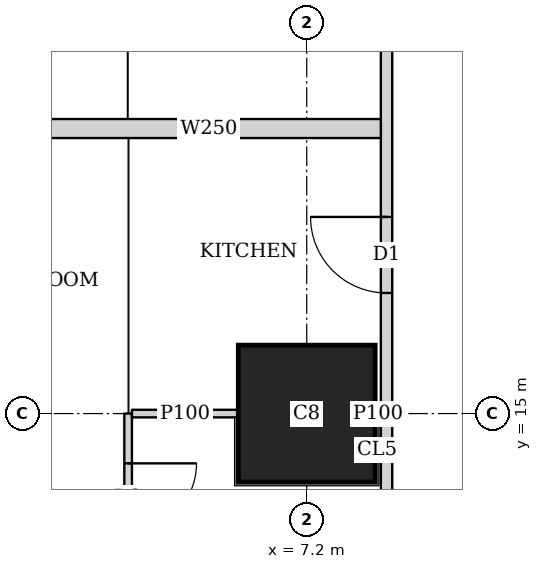
"""IFC4 building model, lengths in metres.
Left out: names, types, materials, properties, quantities, classifications, styles, units other than length and angle.
Written with IfcOpenShell. Run it as: python <this file> out.ifc"""

import sys

from ifc_helpers import new_model, si_unit, direction, frame, frame_2d, origin, origin_2d, place, context, subcontext, project, spatial, rectangle, extrude, element, fill, save


model = new_model("IFC4")
c1 = context("Model", 3, precision=1e-05, world=origin(), true_north=direction((0.0, 1.0)))
c2 = subcontext(c1, "Body", "Model", "MODEL_VIEW")
j1 = project(units=[si_unit("LENGTHUNIT", "METRE"), si_unit("PLANEANGLEUNIT", "RADIAN")], contexts=[c1])
p1 = place(None, origin())
s1 = spatial("IfcSite", under=j1, at=p1, CompositionType="ELEMENT")
p2 = place(p1, origin())
s2 = spatial("IfcBuilding", under=s1, at=p2, CompositionType="ELEMENT")
p3 = place(p2, frame((0.0, 0.0, 31.25)))
s3 = spatial("IfcBuildingStorey", under=s2, at=p3, CompositionType="ELEMENT", Elevation=31.25)
p4 = place(p3, frame((7.2, 15.0, 0.0), z_axis=(0.0, 0.0, 1.0), x_axis=(1.0, 0.0, 0.0)))
e1 = element("IfcColumn", 1, at=p4, inside=s3, PredefinedType="COLUMN", context=c2, shape_type="SweptSolid", body=[
    extrude(rectangle(XDim=1.8, YDim=1.8, at=origin_2d()), origin(), (0.0, 0.0, 1.0), 3.75),
])
p5 = place(p3, frame((8.25, 2.426, 0.0), z_axis=(0.0, 0.0, 1.0), x_axis=(0.0, 1.0, 0.0)))
e2 = element("IfcWall", 2, at=p5, inside=s3, PredefinedType="SOLIDWALL", context=c2, shape_type="SweptSolid", body=[
    extrude(rectangle(XDim=40.173, YDim=0.15, at=frame_2d((20.086, 0.0))), origin(), (0.0, 0.0, 1.0), 3.5),
])
p6 = place(p5, frame((14.161, 0.0, 0.0)))
e3 = element("IfcOpeningElement", 3, at=p6, cuts=e2, PredefinedType="OPENING", context=c2, shape_type="SweptSolid", body=[
    extrude(rectangle(XDim=1.0, YDim=2.1, at=frame_2d((0.5, 1.05))), frame((0.0, 0.085, 0.0), z_axis=(0.0, -1.0, 0.0), x_axis=(1.0, 0.0, 0.0)), (0.0, 0.0, 1.0), 0.17),
])
p7 = place(p5, frame((17.487, 0.0, 0.0)))
e4 = element("IfcOpeningElement", 4, at=p7, cuts=e2, PredefinedType="OPENING", context=c2, shape_type="SweptSolid", body=[
    extrude(rectangle(XDim=1.0, YDim=2.1, at=frame_2d((0.5, 1.05))), frame((0.0, 0.085, 0.0), z_axis=(0.0, -1.0, 0.0), x_axis=(1.0, 0.0, 0.0)), (0.0, 0.0, 1.0), 0.17),
])
p8 = place(p5, frame((29.161, 0.0, 0.0)))
e5 = element("IfcOpeningElement", 5, at=p8, cuts=e2, PredefinedType="OPENING", context=c2, shape_type="SweptSolid", body=[
    extrude(rectangle(XDim=1.0, YDim=2.1, at=frame_2d((0.5, 1.05))), frame((0.0, 0.085, 0.0), z_axis=(0.0, -1.0, 0.0), x_axis=(1.0, 0.0, 0.0)), (0.0, 0.0, 1.0), 0.17),
])
p9 = place(p3, frame((4.85, 3.018, 0.0), z_axis=(0.0, 0.0, 1.0), x_axis=(0.0, 1.0, 0.0)))
e6 = element("IfcWall", 6, at=p9, inside=s3, PredefinedType="PARTITIONING", context=c2, shape_type="SweptSolid", body=[
    extrude(rectangle(XDim=11.982, YDim=0.1, at=frame_2d((5.991, 0.0))), origin(), (0.0, 0.0, 1.0), 3.5),
])
p10 = place(p9, frame((10.427, 0.0, 0.0)))
e7 = element("IfcOpeningElement", 7, at=p10, cuts=e6, PredefinedType="OPENING", context=c2, shape_type="SweptSolid", body=[
    extrude(rectangle(XDim=0.9, YDim=2.1, at=frame_2d((0.45, 1.05))), frame((0.0, 0.06, 0.0), z_axis=(0.0, -1.0, 0.0), x_axis=(1.0, 0.0, 0.0)), (0.0, 0.0, 1.0), 0.12),
])
p11 = place(p9, frame((6.982, 0.0, 0.0)))
e8 = element("IfcOpeningElement", 8, at=p11, cuts=e6, PredefinedType="OPENING", context=c2, shape_type="SweptSolid", body=[
    extrude(rectangle(XDim=0.9, YDim=2.1, at=frame_2d((0.45, 1.05))), frame((0.0, 0.06, 0.0), z_axis=(0.0, -1.0, 0.0), x_axis=(1.0, 0.0, 0.0)), (0.0, 0.0, 1.0), 0.12),
])
p12 = place(p9, frame((3.122, 0.0, 0.0)))
e9 = element("IfcOpeningElement", 9, at=p12, cuts=e6, PredefinedType="OPENING", context=c2, shape_type="SweptSolid", body=[
    extrude(rectangle(XDim=0.9, YDim=2.1, at=frame_2d((0.45, 1.05))), frame((0.0, 0.06, 0.0), z_axis=(0.0, -1.0, 0.0), x_axis=(1.0, 0.0, 0.0)), (0.0, 0.0, 1.0), 0.12),
])
p13 = place(p9, frame((8.552, 0.0, 0.0)))
e10 = element("IfcOpeningElement", 10, at=p13, cuts=e6, PredefinedType="OPENING", context=c2, shape_type="SweptSolid", body=[
    extrude(rectangle(XDim=0.9, YDim=2.1, at=frame_2d((0.45, 1.05))), frame((0.0, 0.06, 0.0), z_axis=(0.0, -1.0, 0.0), x_axis=(1.0, 0.0, 0.0)), (0.0, 0.0, 1.0), 0.12),
])
p14 = place(p9, frame((5.107, 0.0, 0.0)))
e11 = element("IfcOpeningElement", 11, at=p14, cuts=e6, PredefinedType="OPENING", context=c2, shape_type="SweptSolid", body=[
    extrude(rectangle(XDim=0.9, YDim=2.1, at=frame_2d((0.45, 1.05))), frame((0.0, 0.06, 0.0), z_axis=(0.0, -1.0, 0.0), x_axis=(1.0, 0.0, 0.0)), (0.0, 0.0, 1.0), 0.12),
])
p15 = place(p9, frame((1.247, 0.0, 0.0)))
e12 = element("IfcOpeningElement", 12, at=p15, cuts=e6, PredefinedType="OPENING", context=c2, shape_type="SweptSolid", body=[
    extrude(rectangle(XDim=0.9, YDim=2.1, at=frame_2d((0.45, 1.05))), frame((0.0, 0.06, 0.0), z_axis=(0.0, -1.0, 0.0), x_axis=(1.0, 0.0, 0.0)), (0.0, 0.0, 1.0), 0.12),
])
p16 = place(p3, frame((4.9, 15.0, 0.0), z_axis=(0.0, 0.0, 1.0), x_axis=(1.0, 0.0, 0.0)))
e13 = element("IfcWall", 13, at=p16, inside=s3, PredefinedType="PARTITIONING", context=c2, shape_type="SweptSolid", body=[
    extrude(rectangle(XDim=1.399, YDim=0.1, at=frame_2d((0.7, 0.0))), origin(), (0.0, 0.0, 1.0), 3.5),
])
p17 = place(p3, frame((8.101, 15.0, 0.0), z_axis=(0.0, 0.0, 1.0), x_axis=(1.0, 0.0, 0.0)))
e14 = element("IfcWall", 14, at=p17, inside=s3, PredefinedType="PARTITIONING", context=c2, shape_type="SweptSolid", body=[
    extrude(rectangle(XDim=0.074, YDim=0.1, at=frame_2d((0.037, 0.0))), origin(), (0.0, 0.0, 1.0), 3.5),
])
p18 = place(p3, frame((3.65, 18.75, 0.0), z_axis=(0.0, 0.0, 1.0), x_axis=(1.0, 0.0, 0.0)))
e15 = element("IfcWall", 15, at=p18, inside=s3, PredefinedType="SOLIDWALL", context=c2, shape_type="SweptSolid", body=[
    extrude(rectangle(XDim=4.525, YDim=0.25, at=frame_2d((2.263, 0.0))), origin(), (0.0, 0.0, 1.0), 3.5),
])
p19 = place(p10, origin())
e16 = element("IfcDoor", 16, at=p19, inside=s3, OperationType="SINGLE_SWING_LEFT", PredefinedType="DOOR", context=c2, shape_type="SweptSolid", body=[
    extrude(rectangle(XDim=0.9, YDim=2.1, at=frame_2d((0.45, 1.05))), frame((0.0, 0.025, 0.0), z_axis=(0.0, -1.0, 0.0), x_axis=(1.0, 0.0, 0.0)), (0.0, 0.0, 1.0), 0.05),
])
fill(e7, e16)
p20 = place(p6, origin())
e17 = element("IfcDoor", 17, at=p20, inside=s3, OperationType="SINGLE_SWING_RIGHT", PredefinedType="DOOR", context=c2, shape_type="SweptSolid", body=[
    extrude(rectangle(XDim=1.0, YDim=2.1, at=frame_2d((0.5, 1.05))), frame((0.0, 0.025, 0.0), z_axis=(0.0, -1.0, 0.0), x_axis=(1.0, 0.0, 0.0)), (0.0, 0.0, 1.0), 0.05),
])
fill(e3, e17)
save(model, sys.argv[1])
